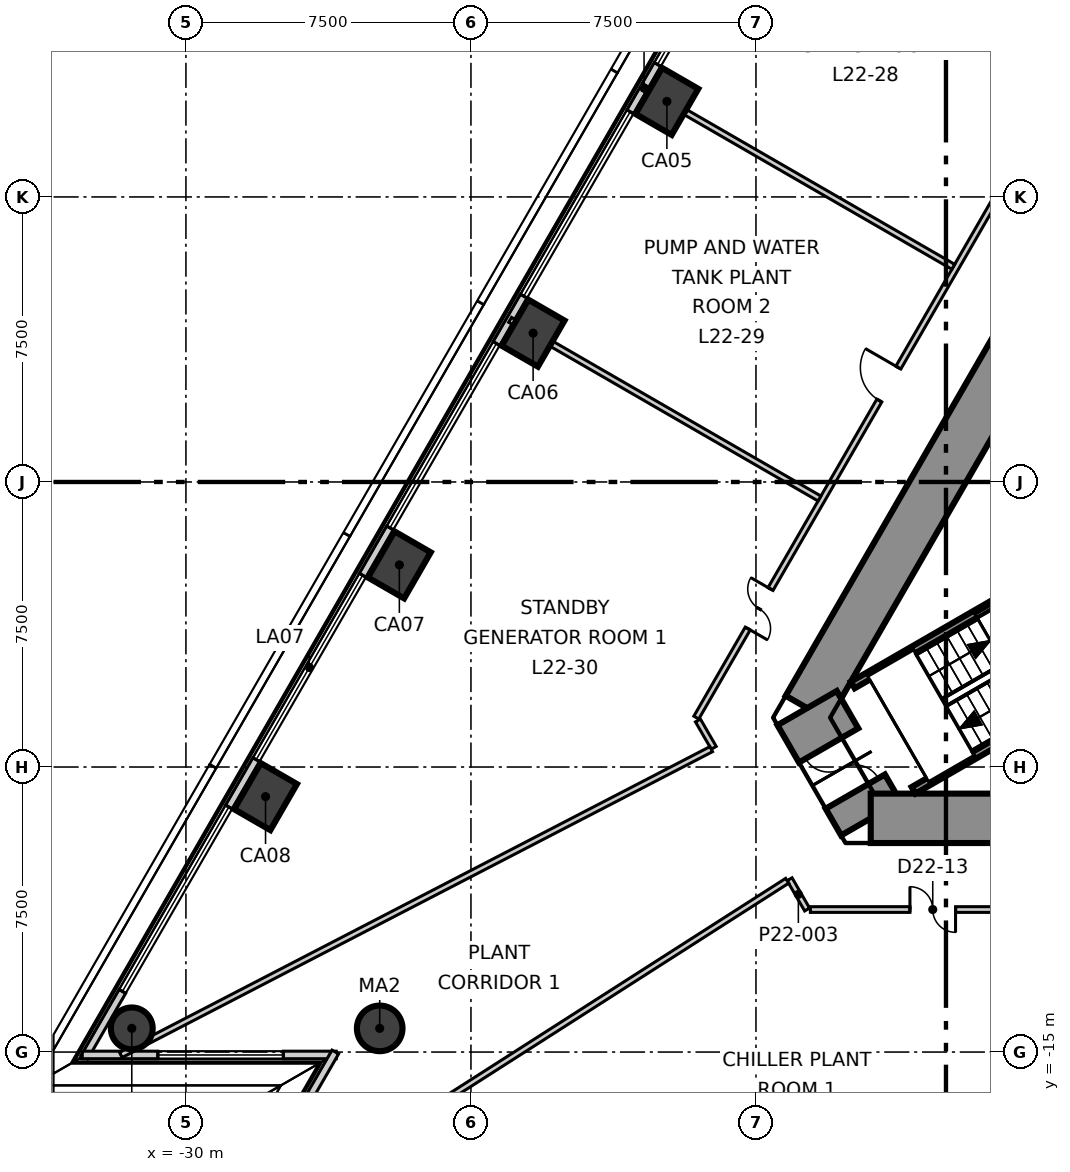
"""IFC4 building model, lengths in metres.
Left out: names, types, materials, properties, quantities, classifications, styles, units other than length and angle.
Written with IfcOpenShell. Run it as: python <this file> out.ifc"""

import sys

from ifc_helpers import new_model, si_unit, direction, frame, frame_2d, origin, origin_2d, place, context, subcontext, project, spatial, polyline, rectangle, circle, outline, extrude, element, fill, save


model = new_model("IFC4")
c1 = context("Model", 3, precision=1e-05, world=origin(), true_north=direction((0.0, 1.0)))
c2 = subcontext(c1, "Body", "Model", "MODEL_VIEW")
j1 = project(units=[si_unit("LENGTHUNIT", "METRE"), si_unit("PLANEANGLEUNIT", "RADIAN")], contexts=[c1])
p1 = place(None, origin())
s1 = spatial("IfcSite", under=j1, at=p1, CompositionType="ELEMENT")
p2 = place(p1, origin())
s2 = spatial("IfcBuilding", under=s1, at=p2, CompositionType="ELEMENT")
p3 = place(p2, frame((0.0, 0.0, 99.8)))
s3 = spatial("IfcBuildingStorey", under=s2, at=p3, CompositionType="ELEMENT", Elevation=99.8)
p4 = place(p3, frame((-1.674, 14.8, -0.6), z_axis=(0.0, 0.0, 1.0), x_axis=(-0.499998822509, -0.866026083608, 0.0)))
e1 = element("IfcWall", 1, at=p4, inside=s3, PredefinedType="SHEAR", context=c2, shape_type="SweptSolid", body=[
    extrude(outline(polyline([(-0.664, -0.65), (1.281, -0.65), (3.226, -0.65), (5.172, -0.65), (7.117, -0.65), (9.062, -0.65), (11.007, -0.65), (12.953, -0.65), (14.898, -0.65), (16.843, -0.65), (18.788, -0.65), (20.734, -0.65), (22.679, -0.65), (24.624, -0.65), (23.296, 0.65), (21.41, 0.65), (19.524, 0.65), (17.638, 0.65), (15.752, 0.65), (13.866, 0.65), (11.98, 0.65), (10.094, 0.65), (8.208, 0.65), (6.322, 0.65), (4.436, 0.65), (2.55, 0.65), (0.664, 0.65), (-0.664, -0.65)])), origin(), (0.0, 0.0, 1.0), 4.8),
])
p5 = place(p4, frame((11.719, 0.0, 0.6)))
e2 = element("IfcOpeningElement", 2, at=p5, cuts=e1, PredefinedType="OPENING", context=c2, shape_type="SweptSolid", body=[
    extrude(rectangle(XDim=1.1, YDim=2.1, at=frame_2d((0.55, 1.05))), frame((0.0, 0.66, 0.0), z_axis=(0.0, -1.0, 0.0), x_axis=(1.0, 0.0, 0.0)), (0.0, 0.0, 1.0), 1.32),
])
p6 = place(p3, frame((-13.654, -5.95, -0.6), z_axis=(0.0, 0.0, 1.0), x_axis=(0.499926515799, -0.866067825751, 0.0)))
e3 = element("IfcWall", 3, at=p6, inside=s3, PredefinedType="SHEAR", context=c2, shape_type="SweptSolid", body=[
    extrude(outline(polyline([(-0.231, -0.9), (1.674, -0.9), (3.579, -0.9), (3.117, 0.9), (1.674, 0.9), (0.231, 0.9), (-0.231, -0.9)])), origin(), (0.0, 0.0, 1.0), 4.8),
])
p7 = place(p6, frame((1.134, 0.0, 0.6)))
e4 = element("IfcOpeningElement", 4, at=p7, cuts=e3, PredefinedType="OPENING", context=c2, shape_type="SweptSolid", body=[
    extrude(rectangle(XDim=1.4, YDim=2.1, at=frame_2d((0.7, 1.05))), frame((0.0, 0.91, 0.0), z_axis=(0.0, -1.0, 0.0), x_axis=(1.0, 0.0, 0.0)), (0.0, 0.0, 1.0), 1.82),
])
p8 = place(p3, frame((-11.98, -8.85, -0.6), z_axis=(0.0, 0.0, 1.0), x_axis=(1.0, 0.0, 0.0)))
e5 = element("IfcWall", 5, at=p8, inside=s3, PredefinedType="SHEAR", context=c2, shape_type="SweptSolid", body=[
    extrude(outline(polyline([(-0.664, -0.65), (1.281, -0.65), (3.226, -0.65), (5.172, -0.65), (7.117, -0.65), (9.062, -0.65), (11.007, -0.65), (12.953, -0.65), (14.898, -0.65), (16.843, -0.65), (18.788, -0.65), (20.734, -0.65), (22.679, -0.65), (24.624, -0.65), (23.296, 0.65), (21.41, 0.65), (19.524, 0.65), (17.638, 0.65), (15.752, 0.65), (13.866, 0.65), (11.98, 0.65), (10.094, 0.65), (8.208, 0.65), (6.322, 0.65), (4.436, 0.65), (2.55, 0.65), (0.664, 0.65), (-0.664, -0.65)])), origin(), (0.0, 0.0, 1.0), 4.8),
])
for number, where, z_axis, x_axis in (
    (6, (-17.344, 10.014, -0.6), (0.0, 0.0, 1.0), (0.5, 0.866, 0.0)),
    (7, (-20.864, 3.916, -0.6), (0.0, 0.0, 1.0), (0.5, 0.866, 0.0)),
    (8, (-24.384, -2.182, -0.6), (0.0, 0.0, 1.0), (0.5, 0.866, 0.0)),
    (9, (-27.905, -8.279, -0.6), (0.0, 0.0, 1.0), (0.5, 0.866, 0.0)),
):
    element("IfcColumn", number, at=place(p3, frame(where, z_axis=z_axis, x_axis=x_axis)), inside=s3, PredefinedType="COLUMN", context=c2, shape_type="SweptSolid", body=[
        extrude(rectangle(XDim=1.4, YDim=1.1, at=origin_2d()), origin(), (0.0, 0.0, 1.0), 4.8),
    ])
p9 = place(p3, frame((-31.425, -14.377, -0.6), z_axis=(0.0, 0.0, 1.0), x_axis=(0.5, 0.866025403784, 0.0)))
e10 = element("IfcColumn", 10, at=p9, inside=s3, PredefinedType="COLUMN", context=c2, shape_type="SweptSolid", body=[
    extrude(circle(Radius=0.55, at=origin_2d()), origin(), (0.0, 0.0, 1.0), 4.8),
])
p10 = place(p3, frame((-24.901, -14.377, -0.6), z_axis=(0.0, 0.0, 1.0), x_axis=(1.0, 0.0, 0.0)))
e11 = element("IfcColumn", 11, at=p10, inside=s3, PredefinedType="COLUMN", context=c2, shape_type="SweptSolid", body=[
    extrude(circle(Radius=0.6, at=origin_2d()), origin(), (0.0, 0.0, 1.0), 4.8),
])
p11 = place(p3, frame((-3.217, 35.882, 0.0), z_axis=(0.0, 0.0, 1.0), x_axis=(-0.499995323711, -0.866028103624, 0.0)))
e12 = element("IfcWall", 12, at=p11, inside=s3, PredefinedType="ELEMENTEDWALL", context=c2, shape_type="SweptSolid", body=[
    extrude(rectangle(XDim=58.913, YDim=0.2, at=frame_2d((29.456, 0.0))), origin(), (0.0, 0.0, 1.0), 4.2),
])
p12 = place(p11, frame((2.023, 0.0, 0.6)))
e13 = element("IfcOpeningElement", 13, at=p12, cuts=e12, PredefinedType="OPENING", context=c2, shape_type="SweptSolid", body=[
    extrude(rectangle(XDim=5.6, YDim=3.0, at=frame_2d((2.8, 1.5))), frame((0.0, 0.11, 0.0), z_axis=(0.0, -1.0, 0.0), x_axis=(1.0, 0.0, 0.0)), (0.0, 0.0, 1.0), 0.22),
])
p13 = place(p11, frame((9.064, 0.0, 0.6)))
e14 = element("IfcOpeningElement", 14, at=p13, cuts=e12, PredefinedType="OPENING", context=c2, shape_type="SweptSolid", body=[
    extrude(rectangle(XDim=5.6, YDim=3.0, at=frame_2d((2.8, 1.5))), frame((0.0, 0.11, 0.0), z_axis=(0.0, -1.0, 0.0), x_axis=(1.0, 0.0, 0.0)), (0.0, 0.0, 1.0), 0.22),
])
p14 = place(p11, frame((16.105, 0.0, 0.6)))
e15 = element("IfcOpeningElement", 15, at=p14, cuts=e12, PredefinedType="OPENING", context=c2, shape_type="SweptSolid", body=[
    extrude(rectangle(XDim=5.6, YDim=3.0, at=frame_2d((2.8, 1.5))), frame((0.0, 0.11, 0.0), z_axis=(0.0, -1.0, 0.0), x_axis=(1.0, 0.0, 0.0)), (0.0, 0.0, 1.0), 0.22),
])
p15 = place(p11, frame((23.146, 0.0, 0.6)))
e16 = element("IfcOpeningElement", 16, at=p15, cuts=e12, PredefinedType="OPENING", context=c2, shape_type="SweptSolid", body=[
    extrude(rectangle(XDim=5.6, YDim=3.0, at=frame_2d((2.8, 1.5))), frame((0.0, 0.11, 0.0), z_axis=(0.0, -1.0, 0.0), x_axis=(1.0, 0.0, 0.0)), (0.0, 0.0, 1.0), 0.22),
])
p16 = place(p11, frame((30.186, 0.0, 0.6)))
e17 = element("IfcOpeningElement", 17, at=p16, cuts=e12, PredefinedType="OPENING", context=c2, shape_type="SweptSolid", body=[
    extrude(rectangle(XDim=5.6, YDim=3.0, at=frame_2d((2.8, 1.5))), frame((0.0, 0.11, 0.0), z_axis=(0.0, -1.0, 0.0), x_axis=(1.0, 0.0, 0.0)), (0.0, 0.0, 1.0), 0.22),
])
p17 = place(p11, frame((37.227, 0.0, 0.6)))
e18 = element("IfcOpeningElement", 18, at=p17, cuts=e12, PredefinedType="OPENING", context=c2, shape_type="SweptSolid", body=[
    extrude(rectangle(XDim=5.6, YDim=3.0, at=frame_2d((2.8, 1.5))), frame((0.0, 0.11, 0.0), z_axis=(0.0, -1.0, 0.0), x_axis=(1.0, 0.0, 0.0)), (0.0, 0.0, 1.0), 0.22),
])
p18 = place(p11, frame((44.268, 0.0, 0.6)))
e19 = element("IfcOpeningElement", 19, at=p18, cuts=e12, PredefinedType="OPENING", context=c2, shape_type="SweptSolid", body=[
    extrude(rectangle(XDim=5.6, YDim=3.0, at=frame_2d((2.8, 1.5))), frame((0.0, 0.11, 0.0), z_axis=(0.0, -1.0, 0.0), x_axis=(1.0, 0.0, 0.0)), (0.0, 0.0, 1.0), 0.22),
])
p19 = place(p11, frame((51.309, 0.0, 0.6)))
e20 = element("IfcOpeningElement", 20, at=p19, cuts=e12, PredefinedType="OPENING", context=c2, shape_type="SweptSolid", body=[
    extrude(rectangle(XDim=5.6, YDim=3.0, at=frame_2d((2.8, 1.5))), frame((0.0, 0.11, 0.0), z_axis=(0.0, -1.0, 0.0), x_axis=(1.0, 0.0, 0.0)), (0.0, 0.0, 1.0), 0.22),
])
p20 = place(p3, frame((-32.728, -15.077, 0.0), z_axis=(0.0, 0.0, 1.0), x_axis=(1.0, 0.0, 0.0)))
e21 = element("IfcWall", 21, at=p20, inside=s3, PredefinedType="ELEMENTEDWALL", context=c2, shape_type="SweptSolid", body=[
    extrude(rectangle(XDim=6.684, YDim=0.2, at=frame_2d((3.342, 0.0))), origin(), (0.0, 0.0, 1.0), 4.2),
])
p21 = place(p20, frame((1.99, 0.0, 0.6)))
e22 = element("IfcOpeningElement", 22, at=p21, cuts=e21, PredefinedType="OPENING", context=c2, shape_type="SweptSolid", body=[
    extrude(rectangle(XDim=3.3, YDim=3.0, at=frame_2d((1.65, 1.5))), frame((0.0, 0.11, 0.0), z_axis=(0.0, -1.0, 0.0), x_axis=(1.0, 0.0, 0.0)), (0.0, 0.0, 1.0), 0.22),
])
p22 = place(p3, frame((-26.069, -14.999, 0.0), z_axis=(0.0, 0.0, 1.0), x_axis=(-0.499941663064, -0.866059082011, 0.0)))
e23 = element("IfcWall", 23, at=p22, inside=s3, PredefinedType="ELEMENTEDWALL", context=c2, shape_type="SweptSolid", body=[
    extrude(rectangle(XDim=6.684, YDim=0.2, at=frame_2d((3.342, 0.0))), origin(), (0.0, 0.0, 1.0), 4.2),
])
p23 = place(p22, frame((1.39, 0.0, 0.6)))
e24 = element("IfcOpeningElement", 24, at=p23, cuts=e23, PredefinedType="OPENING", context=c2, shape_type="SweptSolid", body=[
    extrude(rectangle(XDim=3.3, YDim=3.0, at=frame_2d((1.65, 1.5))), frame((0.0, 0.11, 0.0), z_axis=(0.0, -1.0, 0.0), x_axis=(1.0, 0.0, 0.0)), (0.0, 0.0, 1.0), 0.22),
])
p24 = place(p3, frame((-16.57, -6.2, 0.0), z_axis=(0.0, 0.0, 1.0), x_axis=(0.499993827443, 0.866028967483, 0.0)))
e25 = element("IfcWall", 25, at=p24, inside=s3, PredefinedType="PARTITIONING", context=c2, shape_type="SweptSolid", body=[
    extrude(rectangle(XDim=27.308, YDim=0.15, at=frame_2d((13.654, 0.0))), origin(), (0.0, 0.0, 1.0), 4.2),
])
p25 = place(p24, frame((23.402, 0.0, 0.0)))
e26 = element("IfcOpeningElement", 26, at=p25, cuts=e25, PredefinedType="OPENING", context=c2, shape_type="SweptSolid", body=[
    extrude(rectangle(XDim=1.2, YDim=2.1, at=frame_2d((0.6, 1.05))), frame((0.0, 0.085, 0.0), z_axis=(0.0, -1.0, 0.0), x_axis=(1.0, 0.0, 0.0)), (0.0, 0.0, 1.0), 0.17),
])
p26 = place(p24, frame((16.675, 0.0, 0.0)))
e27 = element("IfcOpeningElement", 27, at=p26, cuts=e25, PredefinedType="OPENING", context=c2, shape_type="SweptSolid", body=[
    extrude(rectangle(XDim=1.0, YDim=2.1, at=frame_2d((0.5, 1.05))), frame((0.0, 0.085, 0.0), z_axis=(0.0, -1.0, 0.0), x_axis=(1.0, 0.0, 0.0)), (0.0, 0.0, 1.0), 0.17),
])
p27 = place(p24, frame((9.634, 0.0, 0.0)))
e28 = element("IfcOpeningElement", 28, at=p27, cuts=e25, PredefinedType="OPENING", context=c2, shape_type="SweptSolid", body=[
    extrude(rectangle(XDim=1.0, YDim=2.1, at=frame_2d((0.5, 1.05))), frame((0.0, 0.085, 0.0), z_axis=(0.0, -1.0, 0.0), x_axis=(1.0, 0.0, 0.0)), (0.0, 0.0, 1.0), 0.17),
])
p28 = place(p24, frame((2.707, 0.0, 0.0)))
e29 = element("IfcOpeningElement", 29, at=p28, cuts=e25, PredefinedType="OPENING", context=c2, shape_type="SweptSolid", body=[
    extrude(rectangle(XDim=1.2, YDim=2.1, at=frame_2d((0.6, 1.05))), frame((0.0, 0.085, 0.0), z_axis=(0.0, -1.0, 0.0), x_axis=(1.0, 0.0, 0.0)), (0.0, 0.0, 1.0), 0.17),
])
p29 = place(p3, frame((-16.527, -6.275, 0.0), z_axis=(0.0, 0.0, 1.0), x_axis=(0.500179786662, -0.865921579021, 0.0)))
e30 = element("IfcWall", 30, at=p29, inside=s3, PredefinedType="PARTITIONING", context=c2, shape_type="SweptSolid", body=[
    extrude(rectangle(XDim=0.832, YDim=0.15, at=frame_2d((0.416, 0.0))), origin(), (0.0, 0.0, 1.0), 4.2),
])
p30 = place(p3, frame((-14.115, -10.452, 0.0), z_axis=(0.0, 0.0, 1.0), x_axis=(0.500127537037, -0.865951757719, 0.0)))
e31 = element("IfcWall", 31, at=p30, inside=s3, PredefinedType="PARTITIONING", context=c2, shape_type="SweptSolid", body=[
    extrude(rectangle(XDim=0.922, YDim=0.15, at=frame_2d((0.461, 0.0))), origin(), (0.0, 0.0, 1.0), 4.2),
])
p31 = place(p3, frame((-31.713, -15.077, 0.0), z_axis=(0.0, 0.0, 1.0), x_axis=(0.887959302536, 0.459922033654, 0.0)))
e32 = element("IfcWall", 32, at=p31, inside=s3, PredefinedType="PARTITIONING", context=c2, shape_type="SweptSolid", body=[
    extrude(rectangle(XDim=17.496, YDim=0.15, at=frame_2d((8.748, 0.0))), origin(), (0.0, 0.0, 1.0), 3.4),
])
p32 = place(p3, frame((-28.907, -19.915, 0.0), z_axis=(0.0, 0.0, 1.0), x_axis=(0.842386762203, 0.53887340152, 0.0)))
e33 = element("IfcWall", 33, at=p32, inside=s3, PredefinedType="PARTITIONING", context=c2, shape_type="SweptSolid", body=[
    extrude(rectangle(XDim=17.485, YDim=0.15, at=frame_2d((8.742, 0.0))), origin(), (0.0, 0.0, 1.0), 3.4),
])
p33 = place(p3, frame((-13.568, -11.25, 0.0), z_axis=(0.0, 0.0, 1.0), x_axis=(1.0, 0.0, 0.0)))
e34 = element("IfcWall", 34, at=p33, inside=s3, PredefinedType="PARTITIONING", context=c2, shape_type="SweptSolid", body=[
    extrude(rectangle(XDim=27.222, YDim=0.15, at=frame_2d((13.611, 0.0))), origin(), (0.0, 0.0, 1.0), 4.2),
])
p34 = place(p33, frame((2.62, 0.0, 0.0)))
e35 = element("IfcOpeningElement", 35, at=p34, cuts=e34, PredefinedType="OPENING", context=c2, shape_type="SweptSolid", body=[
    extrude(rectangle(XDim=1.2, YDim=2.1, at=frame_2d((0.6, 1.05))), frame((0.0, 0.085, 0.0), z_axis=(0.0, -1.0, 0.0), x_axis=(1.0, 0.0, 0.0)), (0.0, 0.0, 1.0), 0.17),
])
p35 = place(p33, frame((12.968, 0.0, 0.0)))
e36 = element("IfcOpeningElement", 36, at=p35, cuts=e34, PredefinedType="OPENING", context=c2, shape_type="SweptSolid", body=[
    extrude(rectangle(XDim=1.2, YDim=2.1, at=frame_2d((0.6, 1.05))), frame((0.0, 0.085, 0.0), z_axis=(0.0, -1.0, 0.0), x_axis=(1.0, 0.0, 0.0)), (0.0, 0.0, 1.0), 0.17),
])
p36 = place(p33, frame((23.316, 0.0, 0.0)))
e37 = element("IfcOpeningElement", 37, at=p36, cuts=e34, PredefinedType="OPENING", context=c2, shape_type="SweptSolid", body=[
    extrude(rectangle(XDim=1.2, YDim=2.1, at=frame_2d((0.6, 1.05))), frame((0.0, 0.085, 0.0), z_axis=(0.0, -1.0, 0.0), x_axis=(1.0, 0.0, 0.0)), (0.0, 0.0, 1.0), 0.17),
])
p37 = place(p3, frame((-21.47, 4.266, 0.0), z_axis=(0.0, 0.0, 1.0), x_axis=(0.866010015463, -0.500026652407, 0.0)))
e38 = element("IfcWall", 38, at=p37, inside=s3, PredefinedType="PARTITIONING", context=c2, shape_type="SweptSolid", body=[
    extrude(rectangle(XDim=9.402, YDim=0.15, at=frame_2d((4.701, 0.0))), origin(), (0.0, 0.0, 1.0), 4.2),
])
p38 = place(p3, frame((-17.95, 10.363, 0.0), z_axis=(0.0, 0.0, 1.0), x_axis=(0.866014767649, -0.500018421874, 0.0)))
e39 = element("IfcWall", 39, at=p38, inside=s3, PredefinedType="PARTITIONING", context=c2, shape_type="SweptSolid", body=[
    extrude(rectangle(XDim=9.402, YDim=0.15, at=frame_2d((4.701, 0.0))), origin(), (0.0, 0.0, 1.0), 3.7),
])
p39 = place(p3, frame((-12.452, -5.342, 0.0), z_axis=(0.0, 0.0, 1.0), x_axis=(0.866002488145, 0.500039688951, 0.0)))
e40 = element("IfcWall", 40, at=p39, inside=s3, PredefinedType="SOLIDWALL", context=c2, shape_type="SweptSolid", body=[
    extrude(rectangle(XDim=6.839, YDim=0.2, at=frame_2d((3.42, 0.0))), origin(), (0.0, 0.0, 1.0), 4.2),
])
p40 = place(p3, frame((-10.853, -8.113, 0.0), z_axis=(0.0, 0.0, 1.0), x_axis=(0.866047105788, 0.499962409144, 0.0)))
e41 = element("IfcWall", 41, at=p40, inside=s3, PredefinedType="SOLIDWALL", context=c2, shape_type="SweptSolid", body=[
    extrude(rectangle(XDim=6.84, YDim=0.2, at=frame_2d((3.42, 0.0))), origin(), (0.0, 0.0, 1.0), 4.2),
])
p41 = place(p15, origin())
e42 = element("IfcWindow", 42, at=p41, inside=s3, PartitioningType="SINGLE_PANEL", PredefinedType="WINDOW", context=c2, shape_type="SweptSolid", body=[
    extrude(rectangle(XDim=5.6, YDim=3.0, at=frame_2d((2.8, 1.5))), frame((0.0, 0.03, 0.0), z_axis=(0.0, -1.0, 0.0), x_axis=(1.0, 0.0, 0.0)), (0.0, 0.0, 1.0), 0.06),
])
fill(e16, e42)
p42 = place(p16, origin())
e43 = element("IfcWindow", 43, at=p42, inside=s3, PartitioningType="SINGLE_PANEL", PredefinedType="WINDOW", context=c2, shape_type="SweptSolid", body=[
    extrude(rectangle(XDim=5.6, YDim=3.0, at=frame_2d((2.8, 1.5))), frame((0.0, 0.03, 0.0), z_axis=(0.0, -1.0, 0.0), x_axis=(1.0, 0.0, 0.0)), (0.0, 0.0, 1.0), 0.06),
])
fill(e17, e43)
p43 = place(p17, origin())
e44 = element("IfcWindow", 44, at=p43, inside=s3, PartitioningType="SINGLE_PANEL", PredefinedType="WINDOW", context=c2, shape_type="SweptSolid", body=[
    extrude(rectangle(XDim=5.6, YDim=3.0, at=frame_2d((2.8, 1.5))), frame((0.0, 0.03, 0.0), z_axis=(0.0, -1.0, 0.0), x_axis=(1.0, 0.0, 0.0)), (0.0, 0.0, 1.0), 0.06),
])
fill(e18, e44)
p44 = place(p18, origin())
e45 = element("IfcWindow", 45, at=p44, inside=s3, PartitioningType="SINGLE_PANEL", PredefinedType="WINDOW", context=c2, shape_type="SweptSolid", body=[
    extrude(rectangle(XDim=5.6, YDim=3.0, at=frame_2d((2.8, 1.5))), frame((0.0, 0.03, 0.0), z_axis=(0.0, -1.0, 0.0), x_axis=(1.0, 0.0, 0.0)), (0.0, 0.0, 1.0), 0.06),
])
fill(e19, e45)
p45 = place(p19, origin())
e46 = element("IfcWindow", 46, at=p45, inside=s3, PartitioningType="SINGLE_PANEL", PredefinedType="WINDOW", context=c2, shape_type="SweptSolid", body=[
    extrude(rectangle(XDim=5.6, YDim=3.0, at=frame_2d((2.8, 1.5))), frame((0.0, 0.03, 0.0), z_axis=(0.0, -1.0, 0.0), x_axis=(1.0, 0.0, 0.0)), (0.0, 0.0, 1.0), 0.06),
])
fill(e20, e46)
p46 = place(p21, origin())
e47 = element("IfcWindow", 47, at=p46, inside=s3, PartitioningType="SINGLE_PANEL", PredefinedType="WINDOW", context=c2, shape_type="SweptSolid", body=[
    extrude(rectangle(XDim=3.3, YDim=3.0, at=frame_2d((1.65, 1.5))), frame((0.0, 0.03, 0.0), z_axis=(0.0, -1.0, 0.0), x_axis=(1.0, 0.0, 0.0)), (0.0, 0.0, 1.0), 0.06),
])
fill(e22, e47)
p47 = place(p34, origin())
e48 = element("IfcDoor", 48, at=p47, inside=s3, OperationType="DOUBLE_DOOR_SINGLE_SWING", PredefinedType="DOOR", context=c2, shape_type="SweptSolid", body=[
    extrude(rectangle(XDim=1.2, YDim=2.1, at=frame_2d((0.6, 1.05))), frame((0.0, 0.025, 0.0), z_axis=(0.0, -1.0, 0.0), x_axis=(1.0, 0.0, 0.0)), (0.0, 0.0, 1.0), 0.05),
])
fill(e35, e48)
p48 = place(p27, origin())
e49 = element("IfcDoor", 49, at=p48, inside=s3, OperationType="SINGLE_SWING_LEFT", PredefinedType="DOOR", context=c2, shape_type="SweptSolid", body=[
    extrude(rectangle(XDim=1.0, YDim=2.1, at=frame_2d((0.5, 1.05))), frame((0.0, 0.025, 0.0), z_axis=(0.0, -1.0, 0.0), x_axis=(1.0, 0.0, 0.0)), (0.0, 0.0, 1.0), 0.05),
])
fill(e28, e49)
p49 = place(p28, origin())
e50 = element("IfcDoor", 50, at=p49, inside=s3, OperationType="DOUBLE_DOOR_SINGLE_SWING", PredefinedType="DOOR", context=c2, shape_type="SweptSolid", body=[
    extrude(rectangle(XDim=1.2, YDim=2.1, at=frame_2d((0.6, 1.05))), frame((0.0, 0.025, 0.0), z_axis=(0.0, -1.0, 0.0), x_axis=(1.0, 0.0, 0.0)), (0.0, 0.0, 1.0), 0.05),
])
fill(e29, e50)
p50 = place(p7, origin())
e51 = element("IfcDoor", 51, at=p50, inside=s3, OperationType="DOUBLE_DOOR_SINGLE_SWING", PredefinedType="DOOR", context=c2, shape_type="SweptSolid", body=[
    extrude(rectangle(XDim=1.4, YDim=2.1, at=frame_2d((0.7, 1.05))), frame((0.0, 0.025, 0.0), z_axis=(0.0, -1.0, 0.0), x_axis=(1.0, 0.0, 0.0)), (0.0, 0.0, 1.0), 0.05),
])
fill(e4, e51)
save(model, sys.argv[1])
